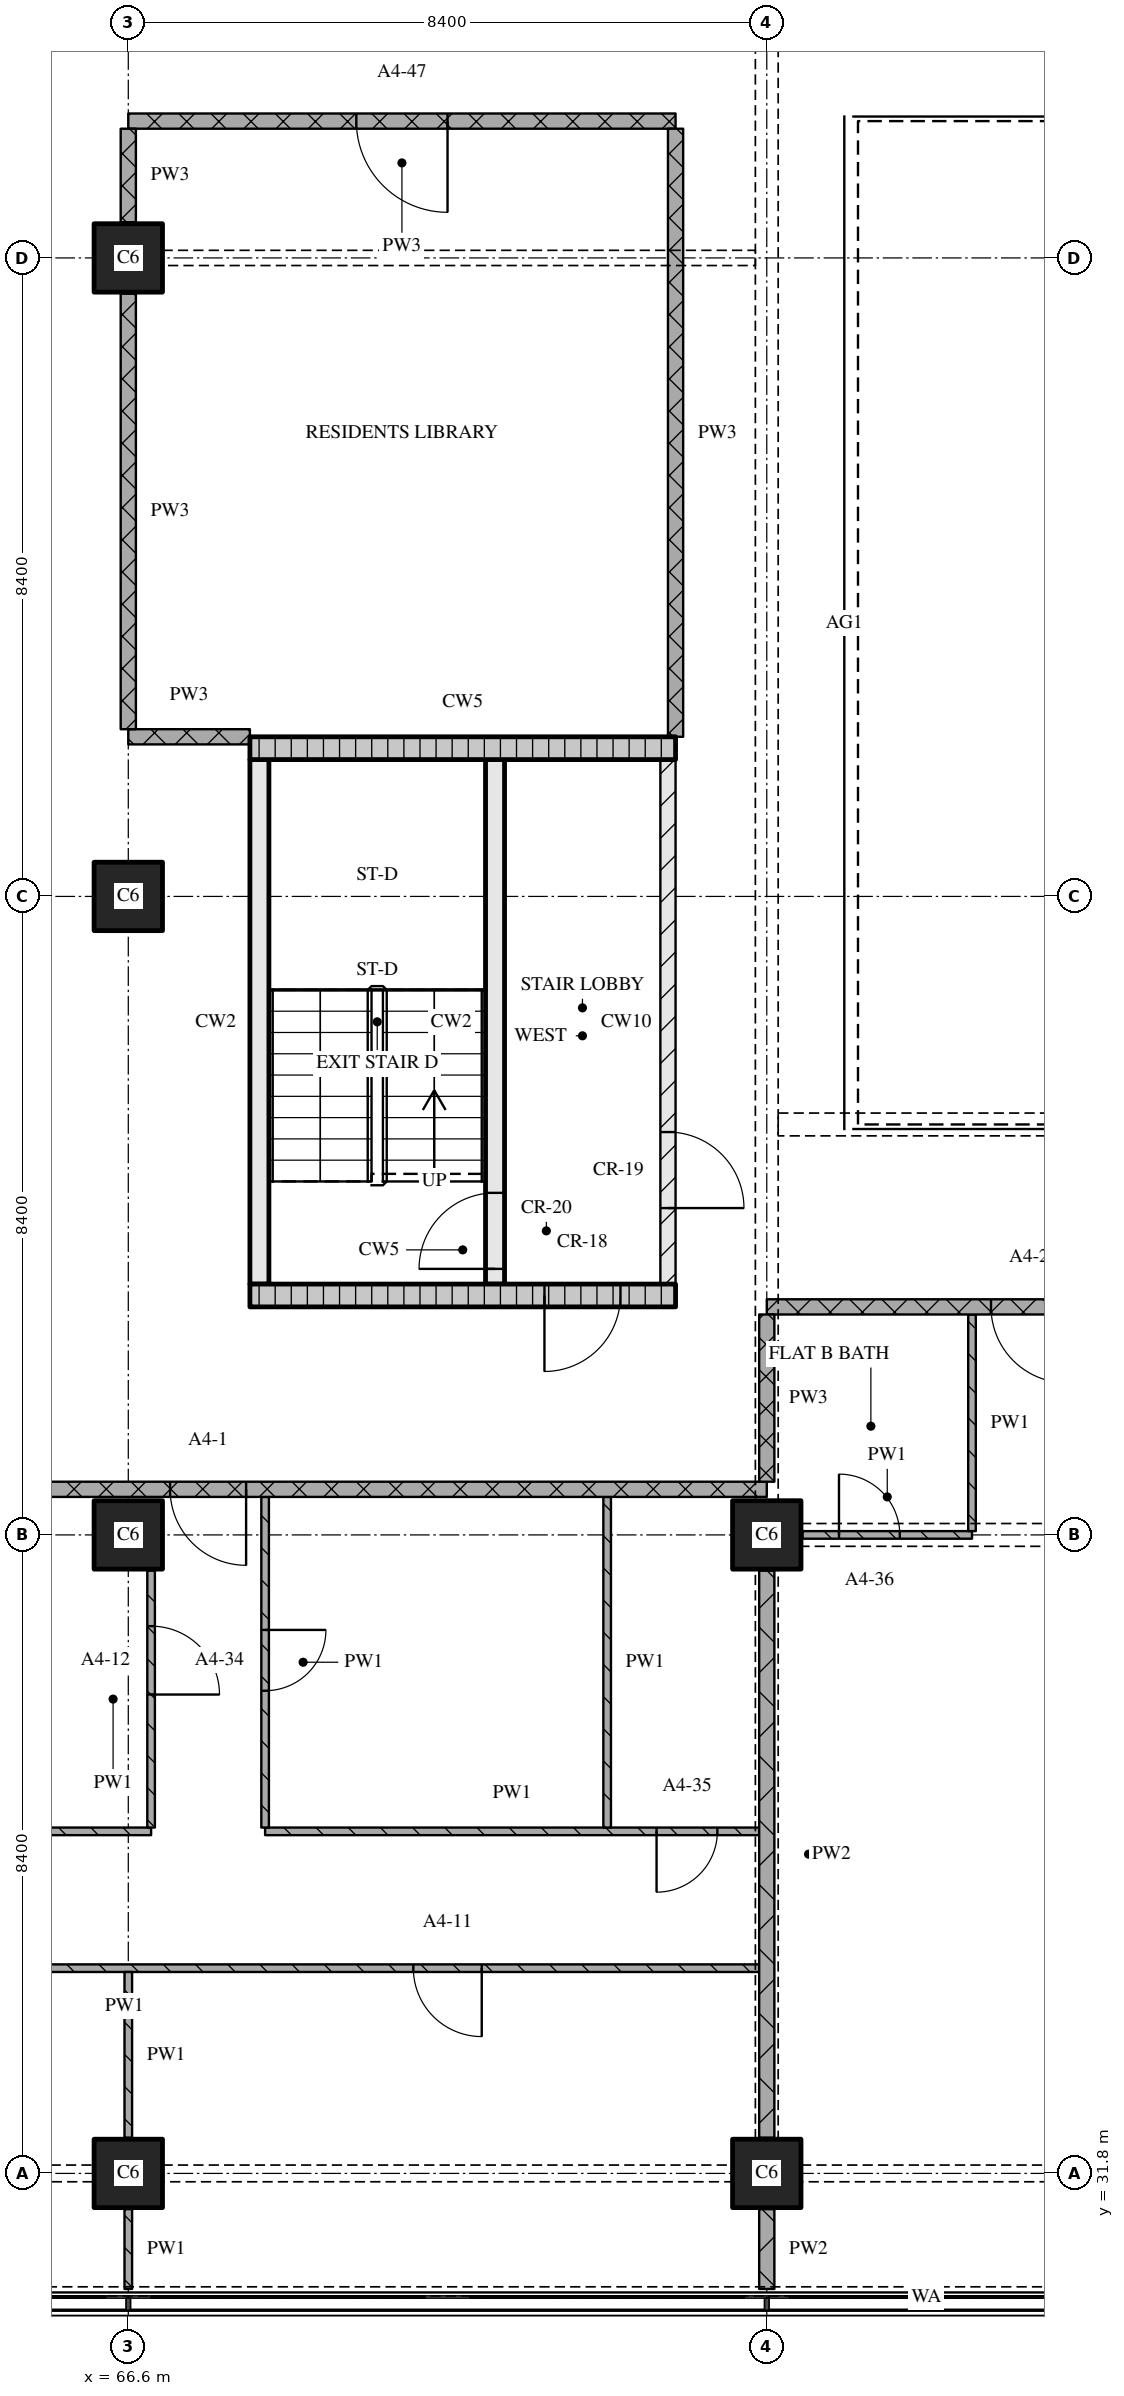
"""IFC4 building model, lengths in metres.
Left out: names, types, materials, properties, quantities, classifications, styles, units other than length and angle.
Written with IfcOpenShell. Run it as: python <this file> out.ifc"""

import sys

from ifc_helpers import new_model, si_unit, direction, frame, frame_2d, origin, origin_2d, place, context, subcontext, project, spatial, rectangle, extrude, element, fill, save


model = new_model("IFC4")
c1 = context("Model", 3, precision=1e-05, world=origin(), true_north=direction((0.0, 1.0)))
c2 = subcontext(c1, "Body", "Model", "MODEL_VIEW")
j1 = project(units=[si_unit("LENGTHUNIT", "METRE"), si_unit("PLANEANGLEUNIT", "RADIAN")], contexts=[c1])
p1 = place(None, origin())
s1 = spatial("IfcSite", under=j1, at=p1, CompositionType="ELEMENT")
p2 = place(p1, origin())
s2 = spatial("IfcBuilding", under=s1, at=p2, CompositionType="ELEMENT")
p3 = place(p2, frame((0.0, 0.0, 76.8)))
s3 = spatial("IfcBuildingStorey", under=s2, at=p3, CompositionType="ELEMENT", Elevation=76.8)
for number, where, z_axis, x_axis in (
    (1, (66.6, 31.8, 0.0), (0.0, 0.0, 1.0), (1.0, 0.0, 0.0)),
    (2, (66.6, 40.2, 0.0), (0.0, 0.0, 1.0), (1.0, 0.0, 0.0)),
    (3, (66.6, 48.6, 0.0), (0.0, 0.0, 1.0), (1.0, 0.0, 0.0)),
    (4, (66.6, 57.0, 0.0), (0.0, 0.0, 1.0), (1.0, 0.0, 0.0)),
    (5, (75.0, 31.8, 0.0), (0.0, 0.0, 1.0), (1.0, 0.0, 0.0)),
    (6, (75.0, 40.2, 0.0), (0.0, 0.0, 1.0), (1.0, 0.0, 0.0)),
):
    element("IfcColumn", number, at=place(p3, frame(where, z_axis=z_axis, x_axis=x_axis)), inside=s3, PredefinedType="COLUMN", context=c2, shape_type="SweptSolid", body=[
        extrude(rectangle(XDim=0.9, YDim=0.9, at=origin_2d()), origin(), (0.0, 0.0, 1.0), 3.6),
    ])
p4 = place(p3, frame((68.2, 43.35, 0.0), z_axis=(0.0, 0.0, 1.0), x_axis=(1.0, 0.0, 0.0)))
e7 = element("IfcWall", 7, at=p4, inside=s3, PredefinedType="SOLIDWALL", context=c2, shape_type="SweptSolid", body=[
    extrude(rectangle(XDim=5.6, YDim=0.3, at=frame_2d((2.8, 0.0))), origin(), (0.0, 0.0, 1.0), 3.32),
])
p5 = place(p4, frame((3.875, 0.0, 0.0)))
e8 = element("IfcOpeningElement", 8, at=p5, cuts=e7, PredefinedType="OPENING", context=c2, shape_type="SweptSolid", body=[
    extrude(rectangle(XDim=1.0, YDim=2.1, at=frame_2d((0.5, 1.05))), frame((0.0, 0.16, 0.0), z_axis=(0.0, -1.0, 0.0), x_axis=(1.0, 0.0, 0.0)), (0.0, 0.0, 1.0), 0.32),
])
p6 = place(p3, frame((68.325, 43.5, 0.0), z_axis=(0.0, 0.0, 1.0), x_axis=(0.0, 1.0, 0.0)))
e9 = element("IfcWall", 9, at=p6, inside=s3, PredefinedType="SOLIDWALL", context=c2, shape_type="SweptSolid", body=[
    extrude(rectangle(XDim=6.9, YDim=0.25, at=frame_2d((3.45, 0.0))), origin(), (0.0, 0.0, 1.0), 3.32),
])
p7 = place(p3, frame((71.425, 43.5, 0.0), z_axis=(0.0, 0.0, 1.0), x_axis=(0.0, 1.0, 0.0)))
e10 = element("IfcWall", 10, at=p7, inside=s3, PredefinedType="SOLIDWALL", context=c2, shape_type="SweptSolid", body=[
    extrude(rectangle(XDim=6.9, YDim=0.25, at=frame_2d((3.45, 0.0))), origin(), (0.0, 0.0, 1.0), 3.32),
])
p8 = place(p7, frame((0.2, 0.0, 0.0)))
e11 = element("IfcOpeningElement", 11, at=p8, cuts=e10, PredefinedType="OPENING", context=c2, shape_type="SweptSolid", body=[
    extrude(rectangle(XDim=1.0, YDim=2.1, at=frame_2d((0.5, 1.05))), frame((0.0, 0.135, 0.0), z_axis=(0.0, -1.0, 0.0), x_axis=(1.0, 0.0, 0.0)), (0.0, 0.0, 1.0), 0.27),
])
p9 = place(p3, frame((73.7, 43.5, 0.0), z_axis=(0.0, 0.0, 1.0), x_axis=(0.0, 1.0, 0.0)))
e12 = element("IfcWall", 12, at=p9, inside=s3, PredefinedType="PARTITIONING", context=c2, shape_type="SweptSolid", body=[
    extrude(rectangle(XDim=6.9, YDim=0.2, at=frame_2d((3.45, 0.0))), origin(), (0.0, 0.0, 1.0), 3.32),
])
p10 = place(p9, frame((1.0, 0.0, 0.0)))
e13 = element("IfcOpeningElement", 13, at=p10, cuts=e12, PredefinedType="OPENING", context=c2, shape_type="SweptSolid", body=[
    extrude(rectangle(XDim=1.0, YDim=2.1, at=frame_2d((0.5, 1.05))), frame((0.0, 0.11, 0.0), z_axis=(0.0, -1.0, 0.0), x_axis=(1.0, 0.0, 0.0)), (0.0, 0.0, 1.0), 0.22),
])
p11 = place(p3, frame((68.2, 50.55, 0.0), z_axis=(0.0, 0.0, 1.0), x_axis=(1.0, 0.0, 0.0)))
e14 = element("IfcWall", 14, at=p11, inside=s3, PredefinedType="SOLIDWALL", context=c2, shape_type="SweptSolid", body=[
    extrude(rectangle(XDim=5.6, YDim=0.3, at=frame_2d((2.8, 0.0))), origin(), (0.0, 0.0, 1.0), 3.32),
])
p12 = place(p3, frame((74.9, 34.5, 0.0), z_axis=(0.0, 0.0, 1.0), x_axis=(-1.0, 0.0, 0.0)))
e15 = element("IfcWall", 15, at=p12, inside=s3, PredefinedType="PARTITIONING", context=c2, shape_type="SweptSolid", body=[
    extrude(rectangle(XDim=16.7, YDim=0.1, at=frame_2d((8.35, 0.0))), origin(), (0.0, 0.0, 1.0), 3.32),
])
p13 = place(p12, frame((3.65, 0.0, 0.0)))
e16 = element("IfcOpeningElement", 16, at=p13, cuts=e15, PredefinedType="OPENING", context=c2, shape_type="SweptSolid", body=[
    extrude(rectangle(XDim=0.9, YDim=2.1, at=frame_2d((0.45, 1.05))), frame((0.0, 0.06, 0.0), z_axis=(0.0, -1.0, 0.0), x_axis=(1.0, 0.0, 0.0)), (0.0, 0.0, 1.0), 0.12),
])
p14 = place(p12, frame((12.05, 0.0, 0.0)))
e17 = element("IfcOpeningElement", 17, at=p14, cuts=e15, PredefinedType="OPENING", context=c2, shape_type="SweptSolid", body=[
    extrude(rectangle(XDim=0.9, YDim=2.1, at=frame_2d((0.45, 1.05))), frame((0.0, 0.06, 0.0), z_axis=(0.0, -1.0, 0.0), x_axis=(1.0, 0.0, 0.0)), (0.0, 0.0, 1.0), 0.12),
])
p15 = place(p3, frame((55.5, 36.3, 0.0), z_axis=(0.0, 0.0, 1.0), x_axis=(1.0, 0.0, 0.0)))
e18 = element("IfcWall", 18, at=p15, inside=s3, PredefinedType="PARTITIONING", context=c2, shape_type="SweptSolid", body=[
    extrude(rectangle(XDim=11.4, YDim=0.1, at=frame_2d((5.7, 0.0))), origin(), (0.0, 0.0, 1.0), 3.32),
])
p16 = place(p3, frame((68.4, 36.3, 0.0), z_axis=(0.0, 0.0, 1.0), x_axis=(1.0, 0.0, 0.0)))
e19 = element("IfcWall", 19, at=p16, inside=s3, PredefinedType="PARTITIONING", context=c2, shape_type="SweptSolid", body=[
    extrude(rectangle(XDim=6.5, YDim=0.1, at=frame_2d((3.25, 0.0))), origin(), (0.0, 0.0, 1.0), 3.32),
])
p17 = place(p16, frame((5.15, 0.0, 0.0)))
e20 = element("IfcOpeningElement", 20, at=p17, cuts=e19, PredefinedType="OPENING", context=c2, shape_type="SweptSolid", body=[
    extrude(rectangle(XDim=0.8, YDim=2.1, at=frame_2d((0.4, 1.05))), frame((0.0, 0.06, 0.0), z_axis=(0.0, -1.0, 0.0), x_axis=(1.0, 0.0, 0.0)), (0.0, 0.0, 1.0), 0.12),
])
p18 = place(p3, frame((75.47, 40.2, 0.0), z_axis=(0.0, 0.0, 1.0), x_axis=(1.0, 0.0, 0.0)))
e21 = element("IfcWall", 21, at=p18, inside=s3, PredefinedType="PARTITIONING", context=c2, shape_type="SweptSolid", body=[
    extrude(rectangle(XDim=2.23, YDim=0.1, at=frame_2d((1.115, 0.0))), origin(), (0.0, 0.0, 1.0), 2.83),
])
p19 = place(p18, frame((0.48, 0.0, 0.0)))
e22 = element("IfcOpeningElement", 22, at=p19, cuts=e21, PredefinedType="OPENING", context=c2, shape_type="SweptSolid", body=[
    extrude(rectangle(XDim=0.8, YDim=2.1, at=frame_2d((0.4, 1.05))), frame((0.0, 0.06, 0.0), z_axis=(0.0, -1.0, 0.0), x_axis=(1.0, 0.0, 0.0)), (0.0, 0.0, 1.0), 0.12),
])
p20 = place(p3, frame((75.0, 40.8, 0.0), z_axis=(0.0, 0.0, 1.0), x_axis=(-1.0, 0.0, 0.0)))
e23 = element("IfcWall", 23, at=p20, inside=s3, PredefinedType="PARTITIONING", context=c2, shape_type="SweptSolid", body=[
    extrude(rectangle(XDim=24.08, YDim=0.2, at=frame_2d((12.04, 0.0))), origin(), (0.0, 0.0, 1.0), 3.32),
])
p21 = place(p20, frame((6.85, 0.0, 0.0)))
e24 = element("IfcOpeningElement", 24, at=p21, cuts=e23, PredefinedType="OPENING", context=c2, shape_type="SweptSolid", body=[
    extrude(rectangle(XDim=1.0, YDim=2.1, at=frame_2d((0.5, 1.05))), frame((0.0, 0.11, 0.0), z_axis=(0.0, -1.0, 0.0), x_axis=(1.0, 0.0, 0.0)), (0.0, 0.0, 1.0), 0.22),
])
p22 = place(p3, frame((100.2, 43.2, 0.0), z_axis=(0.0, 0.0, 1.0), x_axis=(-1.0, 0.0, 0.0)))
e25 = element("IfcWall", 25, at=p22, inside=s3, PredefinedType="PARTITIONING", context=c2, shape_type="SweptSolid", body=[
    extrude(rectangle(XDim=25.2, YDim=0.2, at=frame_2d((12.6, 0.0))), origin(), (0.0, 0.0, 1.0), 3.32),
])
p23 = place(p22, frame((5.95, 0.0, 0.0)))
e26 = element("IfcOpeningElement", 26, at=p23, cuts=e25, PredefinedType="OPENING", context=c2, shape_type="SweptSolid", body=[
    extrude(rectangle(XDim=1.0, YDim=2.1, at=frame_2d((0.5, 1.05))), frame((0.0, 0.11, 0.0), z_axis=(0.0, -1.0, 0.0), x_axis=(1.0, 0.0, 0.0)), (0.0, 0.0, 1.0), 0.22),
])
p24 = place(p22, frame((21.25, 0.0, 0.0)))
e27 = element("IfcOpeningElement", 27, at=p24, cuts=e25, PredefinedType="OPENING", context=c2, shape_type="SweptSolid", body=[
    extrude(rectangle(XDim=1.0, YDim=2.1, at=frame_2d((0.5, 1.05))), frame((0.0, 0.11, 0.0), z_axis=(0.0, -1.0, 0.0), x_axis=(1.0, 0.0, 0.0)), (0.0, 0.0, 1.0), 0.22),
])
p25 = place(p3, frame((66.6, 50.7, 0.0), z_axis=(0.0, 0.0, 1.0), x_axis=(1.0, 0.0, 0.0)))
e28 = element("IfcWall", 28, at=p25, inside=s3, PredefinedType="PARTITIONING", context=c2, shape_type="SweptSolid", body=[
    extrude(rectangle(XDim=1.6, YDim=0.2, at=frame_2d((0.8, 0.0))), origin(), (0.0, 0.0, 1.0), 3.32),
])
p26 = place(p3, frame((73.8, 58.8, 0.0), z_axis=(0.0, 0.0, 1.0), x_axis=(-1.0, 0.0, 0.0)))
e29 = element("IfcWall", 29, at=p26, inside=s3, PredefinedType="PARTITIONING", context=c2, shape_type="SweptSolid", body=[
    extrude(rectangle(XDim=7.2, YDim=0.2, at=frame_2d((3.6, 0.0))), origin(), (0.0, 0.0, 1.0), 3.32),
])
p27 = place(p26, frame((3.0, 0.0, 0.0)))
e30 = element("IfcOpeningElement", 30, at=p27, cuts=e29, PredefinedType="OPENING", context=c2, shape_type="SweptSolid", body=[
    extrude(rectangle(XDim=1.2, YDim=2.1, at=frame_2d((0.6, 1.05))), frame((0.0, 0.11, 0.0), z_axis=(0.0, -1.0, 0.0), x_axis=(1.0, 0.0, 0.0)), (0.0, 0.0, 1.0), 0.22),
])
p28 = place(p3, frame((66.6, 56.53, 0.0), z_axis=(0.0, 0.0, 1.0), x_axis=(0.0, -1.0, 0.0)))
e31 = element("IfcWall", 31, at=p28, inside=s3, PredefinedType="PARTITIONING", context=c2, shape_type="SweptSolid", body=[
    extrude(rectangle(XDim=5.73, YDim=0.2, at=frame_2d((2.865, 0.0))), origin(), (0.0, 0.0, 1.0), 3.32),
])
p29 = place(p3, frame((66.6, 58.7, 0.0), z_axis=(0.0, 0.0, 1.0), x_axis=(0.0, -1.0, 0.0)))
e32 = element("IfcWall", 32, at=p29, inside=s3, PredefinedType="PARTITIONING", context=c2, shape_type="SweptSolid", body=[
    extrude(rectangle(XDim=1.23, YDim=0.2, at=frame_2d((0.615, 0.0))), origin(), (0.0, 0.0, 1.0), 3.32),
])
p30 = place(p3, frame((66.6, 31.33, 0.0), z_axis=(0.0, 0.0, 1.0), x_axis=(0.0, -1.0, 0.0)))
e33 = element("IfcWall", 33, at=p30, inside=s3, PredefinedType="PARTITIONING", context=c2, shape_type="SweptSolid", body=[
    extrude(rectangle(XDim=1.05, YDim=0.1, at=frame_2d((0.525, 0.0))), origin(), (0.0, 0.0, 1.0), 3.32),
])
p31 = place(p3, frame((66.6, 34.45, 0.0), z_axis=(0.0, 0.0, 1.0), x_axis=(0.0, -1.0, 0.0)))
e34 = element("IfcWall", 34, at=p31, inside=s3, PredefinedType="PARTITIONING", context=c2, shape_type="SweptSolid", body=[
    extrude(rectangle(XDim=2.18, YDim=0.1, at=frame_2d((1.09, 0.0))), origin(), (0.0, 0.0, 1.0), 3.32),
])
p32 = place(p3, frame((66.9, 36.35, 0.0), z_axis=(0.0, 0.0, 1.0), x_axis=(0.0, 1.0, 0.0)))
e35 = element("IfcWall", 35, at=p32, inside=s3, PredefinedType="PARTITIONING", context=c2, shape_type="SweptSolid", body=[
    extrude(rectangle(XDim=3.38, YDim=0.1, at=frame_2d((1.69, 0.0))), origin(), (0.0, 0.0, 1.0), 3.32),
])
p33 = place(p32, frame((1.75, 0.0, 0.0)))
e36 = element("IfcOpeningElement", 36, at=p33, cuts=e35, PredefinedType="OPENING", context=c2, shape_type="SweptSolid", body=[
    extrude(rectangle(XDim=0.9, YDim=2.1, at=frame_2d((0.45, 1.05))), frame((0.0, 0.06, 0.0), z_axis=(0.0, -1.0, 0.0), x_axis=(1.0, 0.0, 0.0)), (0.0, 0.0, 1.0), 0.12),
])
p34 = place(p3, frame((68.4, 40.7, 0.0), z_axis=(0.0, 0.0, 1.0), x_axis=(0.0, -1.0, 0.0)))
e37 = element("IfcWall", 37, at=p34, inside=s3, PredefinedType="PARTITIONING", context=c2, shape_type="SweptSolid", body=[
    extrude(rectangle(XDim=4.35, YDim=0.1, at=frame_2d((2.175, 0.0))), origin(), (0.0, 0.0, 1.0), 3.32),
])
p35 = place(p34, frame((1.75, 0.0, 0.0)))
e38 = element("IfcOpeningElement", 38, at=p35, cuts=e37, PredefinedType="OPENING", context=c2, shape_type="SweptSolid", body=[
    extrude(rectangle(XDim=0.8, YDim=2.1, at=frame_2d((0.4, 1.05))), frame((0.0, 0.06, 0.0), z_axis=(0.0, -1.0, 0.0), x_axis=(1.0, 0.0, 0.0)), (0.0, 0.0, 1.0), 0.12),
])
p36 = place(p3, frame((72.9, 40.7, 0.0), z_axis=(0.0, 0.0, 1.0), x_axis=(0.0, -1.0, 0.0)))
e39 = element("IfcWall", 39, at=p36, inside=s3, PredefinedType="PARTITIONING", context=c2, shape_type="SweptSolid", body=[
    extrude(rectangle(XDim=4.35, YDim=0.1, at=frame_2d((2.175, 0.0))), origin(), (0.0, 0.0, 1.0), 3.32),
])
p37 = place(p3, frame((73.8, 58.7, 0.0), z_axis=(0.0, 0.0, 1.0), x_axis=(0.0, -1.0, 0.0)))
e40 = element("IfcWall", 40, at=p37, inside=s3, PredefinedType="PARTITIONING", context=c2, shape_type="SweptSolid", body=[
    extrude(rectangle(XDim=8.0, YDim=0.2, at=frame_2d((4.0, 0.0))), origin(), (0.0, 0.0, 1.0), 3.32),
])
p38 = place(p3, frame((75.0, 43.1, 0.0), z_axis=(0.0, 0.0, 1.0), x_axis=(0.0, -1.0, 0.0)))
e41 = element("IfcWall", 41, at=p38, inside=s3, PredefinedType="PARTITIONING", context=c2, shape_type="SweptSolid", body=[
    extrude(rectangle(XDim=2.2, YDim=0.2, at=frame_2d((1.1, 0.0))), origin(), (0.0, 0.0, 1.0), 2.43),
])
p39 = place(p3, frame((75.0, 31.33, 0.0), z_axis=(0.0, 0.0, 1.0), x_axis=(0.0, -1.0, 0.0)))
e42 = element("IfcWall", 42, at=p39, inside=s3, PredefinedType="PARTITIONING", context=c2, shape_type="SweptSolid", body=[
    extrude(rectangle(XDim=1.05, YDim=0.2, at=frame_2d((0.525, 0.0))), origin(), (0.0, 0.0, 1.0), 3.32),
])
p40 = place(p3, frame((75.0, 39.73, 0.0), z_axis=(0.0, 0.0, 1.0), x_axis=(0.0, -1.0, 0.0)))
e43 = element("IfcWall", 43, at=p40, inside=s3, PredefinedType="PARTITIONING", context=c2, shape_type="SweptSolid", body=[
    extrude(rectangle(XDim=7.46, YDim=0.2, at=frame_2d((3.73, 0.0))), origin(), (0.0, 0.0, 1.0), 2.83),
])
p41 = place(p3, frame((77.7, 43.1, 0.0), z_axis=(0.0, 0.0, 1.0), x_axis=(0.0, -1.0, 0.0)))
e44 = element("IfcWall", 44, at=p41, inside=s3, PredefinedType="PARTITIONING", context=c2, shape_type="SweptSolid", body=[
    extrude(rectangle(XDim=2.85, YDim=0.1, at=frame_2d((1.425, 0.0))), origin(), (0.0, 0.0, 1.0), 3.32),
])
p42 = place(p5, origin())
e45 = element("IfcDoor", 45, at=p42, inside=s3, OperationType="SINGLE_SWING_RIGHT", PredefinedType="DOOR", context=c2, shape_type="SweptSolid", body=[
    extrude(rectangle(XDim=1.0, YDim=2.1, at=frame_2d((0.5, 1.05))), frame((0.0, 0.025, 0.0), z_axis=(0.0, -1.0, 0.0), x_axis=(1.0, 0.0, 0.0)), (0.0, 0.0, 1.0), 0.05),
])
fill(e8, e45)
p43 = place(p8, origin())
e46 = element("IfcDoor", 46, at=p43, inside=s3, OperationType="SINGLE_SWING_LEFT", PredefinedType="DOOR", context=c2, shape_type="SweptSolid", body=[
    extrude(rectangle(XDim=1.0, YDim=2.1, at=frame_2d((0.5, 1.05))), frame((0.0, 0.025, 0.0), z_axis=(0.0, -1.0, 0.0), x_axis=(1.0, 0.0, 0.0)), (0.0, 0.0, 1.0), 0.05),
])
fill(e11, e46)
p44 = place(p10, origin())
e47 = element("IfcDoor", 47, at=p44, inside=s3, OperationType="SINGLE_SWING_RIGHT", PredefinedType="DOOR", context=c2, shape_type="SweptSolid", body=[
    extrude(rectangle(XDim=1.0, YDim=2.1, at=frame_2d((0.5, 1.05))), frame((0.0, 0.025, 0.0), z_axis=(0.0, -1.0, 0.0), x_axis=(1.0, 0.0, 0.0)), (0.0, 0.0, 1.0), 0.05),
])
fill(e13, e47)
p45 = place(p13, origin())
e48 = element("IfcDoor", 48, at=p45, inside=s3, OperationType="SINGLE_SWING_LEFT", PredefinedType="DOOR", context=c2, shape_type="SweptSolid", body=[
    extrude(rectangle(XDim=0.9, YDim=2.1, at=frame_2d((0.45, 1.05))), frame((0.0, 0.025, 0.0), z_axis=(0.0, -1.0, 0.0), x_axis=(1.0, 0.0, 0.0)), (0.0, 0.0, 1.0), 0.05),
])
fill(e16, e48)
p46 = place(p17, origin())
e49 = element("IfcDoor", 49, at=p46, inside=s3, OperationType="SINGLE_SWING_RIGHT", PredefinedType="DOOR", context=c2, shape_type="SweptSolid", body=[
    extrude(rectangle(XDim=0.8, YDim=2.1, at=frame_2d((0.4, 1.05))), frame((0.0, 0.025, 0.0), z_axis=(0.0, -1.0, 0.0), x_axis=(1.0, 0.0, 0.0)), (0.0, 0.0, 1.0), 0.05),
])
fill(e20, e49)
p47 = place(p19, origin())
e50 = element("IfcDoor", 50, at=p47, inside=s3, OperationType="SINGLE_SWING_LEFT", PredefinedType="DOOR", context=c2, shape_type="SweptSolid", body=[
    extrude(rectangle(XDim=0.8, YDim=2.1, at=frame_2d((0.4, 1.05))), frame((0.0, 0.025, 0.0), z_axis=(0.0, -1.0, 0.0), x_axis=(1.0, 0.0, 0.0)), (0.0, 0.0, 1.0), 0.05),
])
fill(e22, e50)
p48 = place(p21, origin())
e51 = element("IfcDoor", 51, at=p48, inside=s3, OperationType="SINGLE_SWING_LEFT", PredefinedType="DOOR", context=c2, shape_type="SweptSolid", body=[
    extrude(rectangle(XDim=1.0, YDim=2.1, at=frame_2d((0.5, 1.05))), frame((0.0, 0.025, 0.0), z_axis=(0.0, -1.0, 0.0), x_axis=(1.0, 0.0, 0.0)), (0.0, 0.0, 1.0), 0.05),
])
fill(e24, e51)
p49 = place(p24, origin())
e52 = element("IfcDoor", 52, at=p49, inside=s3, OperationType="SINGLE_SWING_LEFT", PredefinedType="DOOR", context=c2, shape_type="SweptSolid", body=[
    extrude(rectangle(XDim=1.0, YDim=2.1, at=frame_2d((0.5, 1.05))), frame((0.0, 0.025, 0.0), z_axis=(0.0, -1.0, 0.0), x_axis=(1.0, 0.0, 0.0)), (0.0, 0.0, 1.0), 0.05),
])
fill(e27, e52)
p50 = place(p27, origin())
e53 = element("IfcDoor", 53, at=p50, inside=s3, OperationType="SINGLE_SWING_LEFT", PredefinedType="DOOR", context=c2, shape_type="SweptSolid", body=[
    extrude(rectangle(XDim=1.2, YDim=2.1, at=frame_2d((0.6, 1.05))), frame((0.0, 0.025, 0.0), z_axis=(0.0, -1.0, 0.0), x_axis=(1.0, 0.0, 0.0)), (0.0, 0.0, 1.0), 0.05),
])
fill(e30, e53)
p51 = place(p33, origin())
e54 = element("IfcDoor", 54, at=p51, inside=s3, OperationType="SINGLE_SWING_RIGHT", PredefinedType="DOOR", context=c2, shape_type="SweptSolid", body=[
    extrude(rectangle(XDim=0.9, YDim=2.1, at=frame_2d((0.45, 1.05))), frame((0.0, 0.025, 0.0), z_axis=(0.0, -1.0, 0.0), x_axis=(1.0, 0.0, 0.0)), (0.0, 0.0, 1.0), 0.05),
])
fill(e36, e54)
p52 = place(p35, origin())
e55 = element("IfcDoor", 55, at=p52, inside=s3, OperationType="SINGLE_SWING_LEFT", PredefinedType="DOOR", context=c2, shape_type="SweptSolid", body=[
    extrude(rectangle(XDim=0.8, YDim=2.1, at=frame_2d((0.4, 1.05))), frame((0.0, 0.025, 0.0), z_axis=(0.0, -1.0, 0.0), x_axis=(1.0, 0.0, 0.0)), (0.0, 0.0, 1.0), 0.05),
])
fill(e38, e55)
save(model, sys.argv[1])
